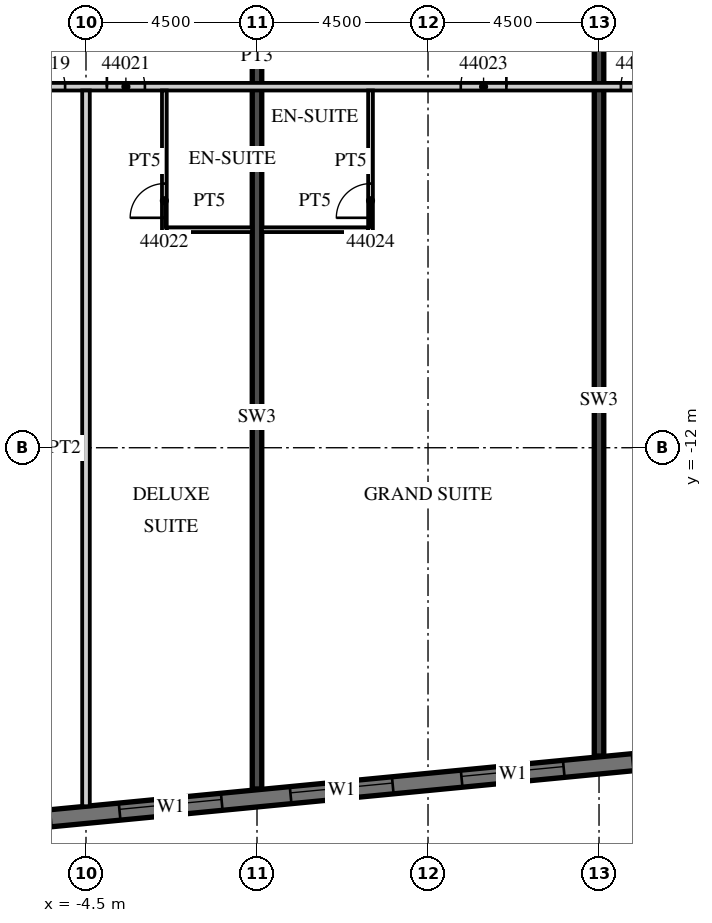
"""IFC4 building model, lengths in metres.
Left out: names, types, materials, properties, quantities, classifications, styles, units other than length and angle.
Written with IfcOpenShell. Run it as: python <this file> out.ifc"""

import sys

from ifc_helpers import new_model, si_unit, direction, frame, frame_2d, origin, place, context, subcontext, project, spatial, rectangle, extrude, element, fill, save


model = new_model("IFC4")
c1 = context("Model", 3, precision=1e-05, world=origin(), true_north=direction((0.0, 1.0)))
c2 = subcontext(c1, "Body", "Model", "MODEL_VIEW")
j1 = project(units=[si_unit("LENGTHUNIT", "METRE"), si_unit("PLANEANGLEUNIT", "RADIAN")], contexts=[c1])
p1 = place(None, origin())
s1 = spatial("IfcSite", under=j1, at=p1, CompositionType="ELEMENT")
p2 = place(p1, origin())
s2 = spatial("IfcBuilding", under=s1, at=p2, CompositionType="ELEMENT")
p3 = place(p2, frame((0.0, 0.0, 186.7)))
s3 = spatial("IfcBuildingStorey", under=s2, at=p3, CompositionType="ELEMENT", Elevation=186.7)
p4 = place(p3, frame((0.0, -20.979, 0.0), z_axis=(0.0, 0.0, 1.0), x_axis=(0.0, 1.0, 0.0)))
e1 = element("IfcWall", 1, at=p4, inside=s3, PredefinedType="SHEAR", context=c2, shape_type="SweptSolid", body=[
    extrude(rectangle(XDim=19.579, YDim=0.25, at=frame_2d((9.789, 0.0))), origin(), (0.0, 0.0, 1.0), 3.3),
])
p5 = place(p3, frame((9.0, -20.112, 0.0), z_axis=(0.0, 0.0, 1.0), x_axis=(0.0, 1.0, 0.0)))
e2 = element("IfcWall", 2, at=p5, inside=s3, PredefinedType="SHEAR", context=c2, shape_type="SweptSolid", body=[
    extrude(rectangle(XDim=18.712, YDim=0.25, at=frame_2d((9.356, 0.0))), origin(), (0.0, 0.0, 1.0), 3.3),
])
p6 = place(p3, frame((-13.521, -22.529, 0.0), z_axis=(0.0, 0.0, 1.0), x_axis=(0.995396436651, 0.095843277819, 0.0)))
e3 = element("IfcWall", 3, at=p6, inside=s3, PredefinedType="SOLIDWALL", context=c2, shape_type="SweptSolid", body=[
    extrude(rectangle(XDim=51.578, YDim=0.45, at=frame_2d((25.789, 0.0))), origin(), (0.0, 0.0, 1.0), 3.02),
])
p7 = place(p6, frame((0.91, 0.0, 0.45)))
e4 = element("IfcOpeningElement", 4, at=p7, cuts=e3, PredefinedType="OPENING", context=c2, shape_type="SweptSolid", body=[
    extrude(rectangle(XDim=2.7, YDim=2.25, at=frame_2d((1.35, 1.125))), frame((0.0, 0.235, 0.0), z_axis=(0.0, -1.0, 0.0), x_axis=(1.0, 0.0, 0.0)), (0.0, 0.0, 1.0), 0.47),
])
p8 = place(p6, frame((5.431, 0.0, 0.45)))
e5 = element("IfcOpeningElement", 5, at=p8, cuts=e3, PredefinedType="OPENING", context=c2, shape_type="SweptSolid", body=[
    extrude(rectangle(XDim=2.7, YDim=2.25, at=frame_2d((1.35, 1.125))), frame((0.0, 0.235, 0.0), z_axis=(0.0, -1.0, 0.0), x_axis=(1.0, 0.0, 0.0)), (0.0, 0.0, 1.0), 0.47),
])
p9 = place(p6, frame((9.952, 0.0, 0.45)))
e6 = element("IfcOpeningElement", 6, at=p9, cuts=e3, PredefinedType="OPENING", context=c2, shape_type="SweptSolid", body=[
    extrude(rectangle(XDim=2.7, YDim=2.25, at=frame_2d((1.35, 1.125))), frame((0.0, 0.235, 0.0), z_axis=(0.0, -1.0, 0.0), x_axis=(1.0, 0.0, 0.0)), (0.0, 0.0, 1.0), 0.47),
])
p10 = place(p6, frame((14.473, 0.0, 0.45)))
e7 = element("IfcOpeningElement", 7, at=p10, cuts=e3, PredefinedType="OPENING", context=c2, shape_type="SweptSolid", body=[
    extrude(rectangle(XDim=2.7, YDim=2.25, at=frame_2d((1.35, 1.125))), frame((0.0, 0.235, 0.0), z_axis=(0.0, -1.0, 0.0), x_axis=(1.0, 0.0, 0.0)), (0.0, 0.0, 1.0), 0.47),
])
p11 = place(p6, frame((18.994, 0.0, 0.45)))
e8 = element("IfcOpeningElement", 8, at=p11, cuts=e3, PredefinedType="OPENING", context=c2, shape_type="SweptSolid", body=[
    extrude(rectangle(XDim=2.7, YDim=2.25, at=frame_2d((1.35, 1.125))), frame((0.0, 0.235, 0.0), z_axis=(0.0, -1.0, 0.0), x_axis=(1.0, 0.0, 0.0)), (0.0, 0.0, 1.0), 0.47),
])
p12 = place(p6, frame((23.514, 0.0, 0.45)))
e9 = element("IfcOpeningElement", 9, at=p12, cuts=e3, PredefinedType="OPENING", context=c2, shape_type="SweptSolid", body=[
    extrude(rectangle(XDim=2.7, YDim=2.25, at=frame_2d((1.35, 1.125))), frame((0.0, 0.235, 0.0), z_axis=(0.0, -1.0, 0.0), x_axis=(1.0, 0.0, 0.0)), (0.0, 0.0, 1.0), 0.47),
])
p13 = place(p6, frame((28.035, 0.0, 0.45)))
e10 = element("IfcOpeningElement", 10, at=p13, cuts=e3, PredefinedType="OPENING", context=c2, shape_type="SweptSolid", body=[
    extrude(rectangle(XDim=2.7, YDim=2.25, at=frame_2d((1.35, 1.125))), frame((0.0, 0.235, 0.0), z_axis=(0.0, -1.0, 0.0), x_axis=(1.0, 0.0, 0.0)), (0.0, 0.0, 1.0), 0.47),
])
p14 = place(p6, frame((32.556, 0.0, 0.45)))
e11 = element("IfcOpeningElement", 11, at=p14, cuts=e3, PredefinedType="OPENING", context=c2, shape_type="SweptSolid", body=[
    extrude(rectangle(XDim=2.7, YDim=2.25, at=frame_2d((1.35, 1.125))), frame((0.0, 0.235, 0.0), z_axis=(0.0, -1.0, 0.0), x_axis=(1.0, 0.0, 0.0)), (0.0, 0.0, 1.0), 0.47),
])
p15 = place(p6, frame((37.077, 0.0, 0.45)))
e12 = element("IfcOpeningElement", 12, at=p15, cuts=e3, PredefinedType="OPENING", context=c2, shape_type="SweptSolid", body=[
    extrude(rectangle(XDim=2.7, YDim=2.25, at=frame_2d((1.35, 1.125))), frame((0.0, 0.235, 0.0), z_axis=(0.0, -1.0, 0.0), x_axis=(1.0, 0.0, 0.0)), (0.0, 0.0, 1.0), 0.47),
])
p16 = place(p6, frame((41.598, 0.0, 0.45)))
e13 = element("IfcOpeningElement", 13, at=p16, cuts=e3, PredefinedType="OPENING", context=c2, shape_type="SweptSolid", body=[
    extrude(rectangle(XDim=2.7, YDim=2.25, at=frame_2d((1.35, 1.125))), frame((0.0, 0.235, 0.0), z_axis=(0.0, -1.0, 0.0), x_axis=(1.0, 0.0, 0.0)), (0.0, 0.0, 1.0), 0.47),
])
p17 = place(p6, frame((46.119, 0.0, 0.45)))
e14 = element("IfcOpeningElement", 14, at=p17, cuts=e3, PredefinedType="OPENING", context=c2, shape_type="SweptSolid", body=[
    extrude(rectangle(XDim=2.7, YDim=2.25, at=frame_2d((1.35, 1.125))), frame((0.0, 0.235, 0.0), z_axis=(0.0, -1.0, 0.0), x_axis=(1.0, 0.0, 0.0)), (0.0, 0.0, 1.0), 0.47),
])
p18 = place(p3, frame((-13.5, -2.5, 0.0), z_axis=(0.0, 0.0, 1.0), x_axis=(1.0, 0.0, 0.0)))
e15 = element("IfcWall", 15, at=p18, inside=s3, PredefinedType="PARTITIONING", context=c2, shape_type="SweptSolid", body=[
    extrude(rectangle(XDim=27.0, YDim=0.2, at=frame_2d((13.5, 0.0))), origin(), (0.0, 0.0, 1.0), 3.02),
])
p19 = place(p18, frame((0.575, 0.0, 0.0)))
e16 = element("IfcOpeningElement", 16, at=p19, cuts=e15, PredefinedType="OPENING", context=c2, shape_type="SweptSolid", body=[
    extrude(rectangle(XDim=1.0, YDim=2.1, at=frame_2d((0.5, 1.05))), frame((0.0, 0.11, 0.0), z_axis=(0.0, -1.0, 0.0), x_axis=(1.0, 0.0, 0.0)), (0.0, 0.0, 1.0), 0.22),
])
p20 = place(p18, frame((7.45, 0.0, 0.0)))
e17 = element("IfcOpeningElement", 17, at=p20, cuts=e15, PredefinedType="OPENING", context=c2, shape_type="SweptSolid", body=[
    extrude(rectangle(XDim=1.0, YDim=2.1, at=frame_2d((0.5, 1.05))), frame((0.0, 0.11, 0.0), z_axis=(0.0, -1.0, 0.0), x_axis=(1.0, 0.0, 0.0)), (0.0, 0.0, 1.0), 0.22),
])
p21 = place(p18, frame((9.55, 0.0, 0.0)))
e18 = element("IfcOpeningElement", 18, at=p21, cuts=e15, PredefinedType="OPENING", context=c2, shape_type="SweptSolid", body=[
    extrude(rectangle(XDim=1.0, YDim=2.1, at=frame_2d((0.5, 1.05))), frame((0.0, 0.11, 0.0), z_axis=(0.0, -1.0, 0.0), x_axis=(1.0, 0.0, 0.0)), (0.0, 0.0, 1.0), 0.22),
])
p22 = place(p18, frame((18.862, 0.0, 0.0)))
e19 = element("IfcOpeningElement", 19, at=p22, cuts=e15, PredefinedType="OPENING", context=c2, shape_type="SweptSolid", body=[
    extrude(rectangle(XDim=1.2, YDim=2.1, at=frame_2d((0.6, 1.05))), frame((0.0, 0.11, 0.0), z_axis=(0.0, -1.0, 0.0), x_axis=(1.0, 0.0, 0.0)), (0.0, 0.0, 1.0), 0.22),
])
p23 = place(p18, frame((23.075, 0.0, 0.0)))
e20 = element("IfcOpeningElement", 20, at=p23, cuts=e15, PredefinedType="OPENING", context=c2, shape_type="SweptSolid", body=[
    extrude(rectangle(XDim=1.0, YDim=2.1, at=frame_2d((0.5, 1.05))), frame((0.0, 0.11, 0.0), z_axis=(0.0, -1.0, 0.0), x_axis=(1.0, 0.0, 0.0)), (0.0, 0.0, 1.0), 0.22),
])
p24 = place(p3, frame((-4.5, -21.434, 0.0), z_axis=(0.0, 0.0, 1.0), x_axis=(0.0, 1.0, 0.0)))
e21 = element("IfcWall", 21, at=p24, inside=s3, PredefinedType="PARTITIONING", context=c2, shape_type="SweptSolid", body=[
    extrude(rectangle(XDim=18.834, YDim=0.2, at=frame_2d((9.417, 0.0))), origin(), (0.0, 0.0, 1.0), 3.02),
])
p25 = place(p3, frame((-2.438, -6.325, 0.0), z_axis=(0.0, 0.0, 1.0), x_axis=(0.0, 1.0, 0.0)))
e22 = element("IfcWall", 22, at=p25, inside=s3, PredefinedType="PARTITIONING", context=c2, shape_type="SweptSolid", body=[
    extrude(rectangle(XDim=3.725, YDim=0.125, at=frame_2d((1.862, 0.0))), origin(), (0.0, 0.0, 1.0), 3.02),
])
p26 = place(p25, frame((0.375, 0.0, 0.0)))
e23 = element("IfcOpeningElement", 23, at=p26, cuts=e22, PredefinedType="OPENING", context=c2, shape_type="SweptSolid", body=[
    extrude(rectangle(XDim=0.9, YDim=2.1, at=frame_2d((0.45, 1.05))), frame((0.0, 0.073, 0.0), z_axis=(0.0, -1.0, 0.0), x_axis=(1.0, 0.0, 0.0)), (0.0, 0.0, 1.0), 0.145),
])
p27 = place(p3, frame((-2.375, -6.263, 0.0), z_axis=(0.0, 0.0, 1.0), x_axis=(1.0, 0.0, 0.0)))
e24 = element("IfcWall", 24, at=p27, inside=s3, PredefinedType="PARTITIONING", context=c2, shape_type="SweptSolid", body=[
    extrude(rectangle(XDim=2.25, YDim=0.125, at=frame_2d((1.125, 0.0))), origin(), (0.0, 0.0, 1.0), 3.02),
])
p28 = place(p3, frame((2.987, -6.325, 0.0), z_axis=(0.0, 0.0, 1.0), x_axis=(0.0, 1.0, 0.0)))
e25 = element("IfcWall", 25, at=p28, inside=s3, PredefinedType="PARTITIONING", context=c2, shape_type="SweptSolid", body=[
    extrude(rectangle(XDim=3.725, YDim=0.125, at=frame_2d((1.862, 0.0))), origin(), (0.0, 0.0, 1.0), 3.02),
])
p29 = place(p28, frame((0.375, 0.0, 0.0)))
e26 = element("IfcOpeningElement", 26, at=p29, cuts=e25, PredefinedType="OPENING", context=c2, shape_type="SweptSolid", body=[
    extrude(rectangle(XDim=0.9, YDim=2.1, at=frame_2d((0.45, 1.05))), frame((0.0, 0.073, 0.0), z_axis=(0.0, -1.0, 0.0), x_axis=(1.0, 0.0, 0.0)), (0.0, 0.0, 1.0), 0.145),
])
p30 = place(p3, frame((0.125, -6.263, 0.0), z_axis=(0.0, 0.0, 1.0), x_axis=(1.0, 0.0, 0.0)))
e27 = element("IfcWall", 27, at=p30, inside=s3, PredefinedType="PARTITIONING", context=c2, shape_type="SweptSolid", body=[
    extrude(rectangle(XDim=2.8, YDim=0.125, at=frame_2d((1.4, 0.0))), origin(), (0.0, 0.0, 1.0), 3.02),
])
p31 = place(p9, origin())
e28 = element("IfcWindow", 28, at=p31, inside=s3, PartitioningType="SINGLE_PANEL", PredefinedType="WINDOW", context=c2, shape_type="SweptSolid", body=[
    extrude(rectangle(XDim=2.7, YDim=2.25, at=frame_2d((1.35, 1.125))), frame((0.0, 0.09, 0.0), z_axis=(0.0, -1.0, 0.0), x_axis=(1.0, 0.0, 0.0)), (0.0, 0.0, 1.0), 0.06),
])
fill(e6, e28)
p32 = place(p10, origin())
e29 = element("IfcWindow", 29, at=p32, inside=s3, PartitioningType="SINGLE_PANEL", PredefinedType="WINDOW", context=c2, shape_type="SweptSolid", body=[
    extrude(rectangle(XDim=2.7, YDim=2.25, at=frame_2d((1.35, 1.125))), frame((0.0, 0.09, 0.0), z_axis=(0.0, -1.0, 0.0), x_axis=(1.0, 0.0, 0.0)), (0.0, 0.0, 1.0), 0.06),
])
fill(e7, e29)
p33 = place(p11, origin())
e30 = element("IfcWindow", 30, at=p33, inside=s3, PartitioningType="SINGLE_PANEL", PredefinedType="WINDOW", context=c2, shape_type="SweptSolid", body=[
    extrude(rectangle(XDim=2.7, YDim=2.25, at=frame_2d((1.35, 1.125))), frame((0.0, 0.09, 0.0), z_axis=(0.0, -1.0, 0.0), x_axis=(1.0, 0.0, 0.0)), (0.0, 0.0, 1.0), 0.06),
])
fill(e8, e30)
p34 = place(p20, origin())
e31 = element("IfcDoor", 31, at=p34, inside=s3, OperationType="SINGLE_SWING_LEFT", PredefinedType="DOOR", context=c2, shape_type="SweptSolid", body=[
    extrude(rectangle(XDim=1.0, YDim=2.1, at=frame_2d((0.5, 1.05))), frame((0.0, 0.025, 0.0), z_axis=(0.0, -1.0, 0.0), x_axis=(1.0, 0.0, 0.0)), (0.0, 0.0, 1.0), 0.05),
])
fill(e17, e31)
p35 = place(p21, origin())
e32 = element("IfcDoor", 32, at=p35, inside=s3, OperationType="SINGLE_SWING_LEFT", PredefinedType="DOOR", context=c2, shape_type="SweptSolid", body=[
    extrude(rectangle(XDim=1.0, YDim=2.1, at=frame_2d((0.5, 1.05))), frame((0.0, 0.025, 0.0), z_axis=(0.0, -1.0, 0.0), x_axis=(1.0, 0.0, 0.0)), (0.0, 0.0, 1.0), 0.05),
])
fill(e18, e32)
p36 = place(p26, origin())
e33 = element("IfcDoor", 33, at=p36, inside=s3, OperationType="SINGLE_SWING_LEFT", PredefinedType="DOOR", context=c2, shape_type="SweptSolid", body=[
    extrude(rectangle(XDim=0.9, YDim=2.1, at=frame_2d((0.45, 1.05))), frame((0.0, 0.025, 0.0), z_axis=(0.0, -1.0, 0.0), x_axis=(1.0, 0.0, 0.0)), (0.0, 0.0, 1.0), 0.05),
])
fill(e23, e33)
p37 = place(p22, origin())
e34 = element("IfcDoor", 34, at=p37, inside=s3, OperationType="SINGLE_SWING_RIGHT", PredefinedType="DOOR", context=c2, shape_type="SweptSolid", body=[
    extrude(rectangle(XDim=1.2, YDim=2.1, at=frame_2d((0.6, 1.05))), frame((0.0, 0.025, 0.0), z_axis=(0.0, -1.0, 0.0), x_axis=(1.0, 0.0, 0.0)), (0.0, 0.0, 1.0), 0.05),
])
fill(e19, e34)
p38 = place(p29, origin())
e35 = element("IfcDoor", 35, at=p38, inside=s3, OperationType="SINGLE_SWING_LEFT", PredefinedType="DOOR", context=c2, shape_type="SweptSolid", body=[
    extrude(rectangle(XDim=0.9, YDim=2.1, at=frame_2d((0.45, 1.05))), frame((0.0, 0.025, 0.0), z_axis=(0.0, -1.0, 0.0), x_axis=(1.0, 0.0, 0.0)), (0.0, 0.0, 1.0), 0.05),
])
fill(e26, e35)
p39 = place(p23, origin())
e36 = element("IfcDoor", 36, at=p39, inside=s3, OperationType="SINGLE_SWING_RIGHT", PredefinedType="DOOR", context=c2, shape_type="SweptSolid", body=[
    extrude(rectangle(XDim=1.0, YDim=2.1, at=frame_2d((0.5, 1.05))), frame((0.0, 0.025, 0.0), z_axis=(0.0, -1.0, 0.0), x_axis=(1.0, 0.0, 0.0)), (0.0, 0.0, 1.0), 0.05),
])
fill(e20, e36)
save(model, sys.argv[1])
